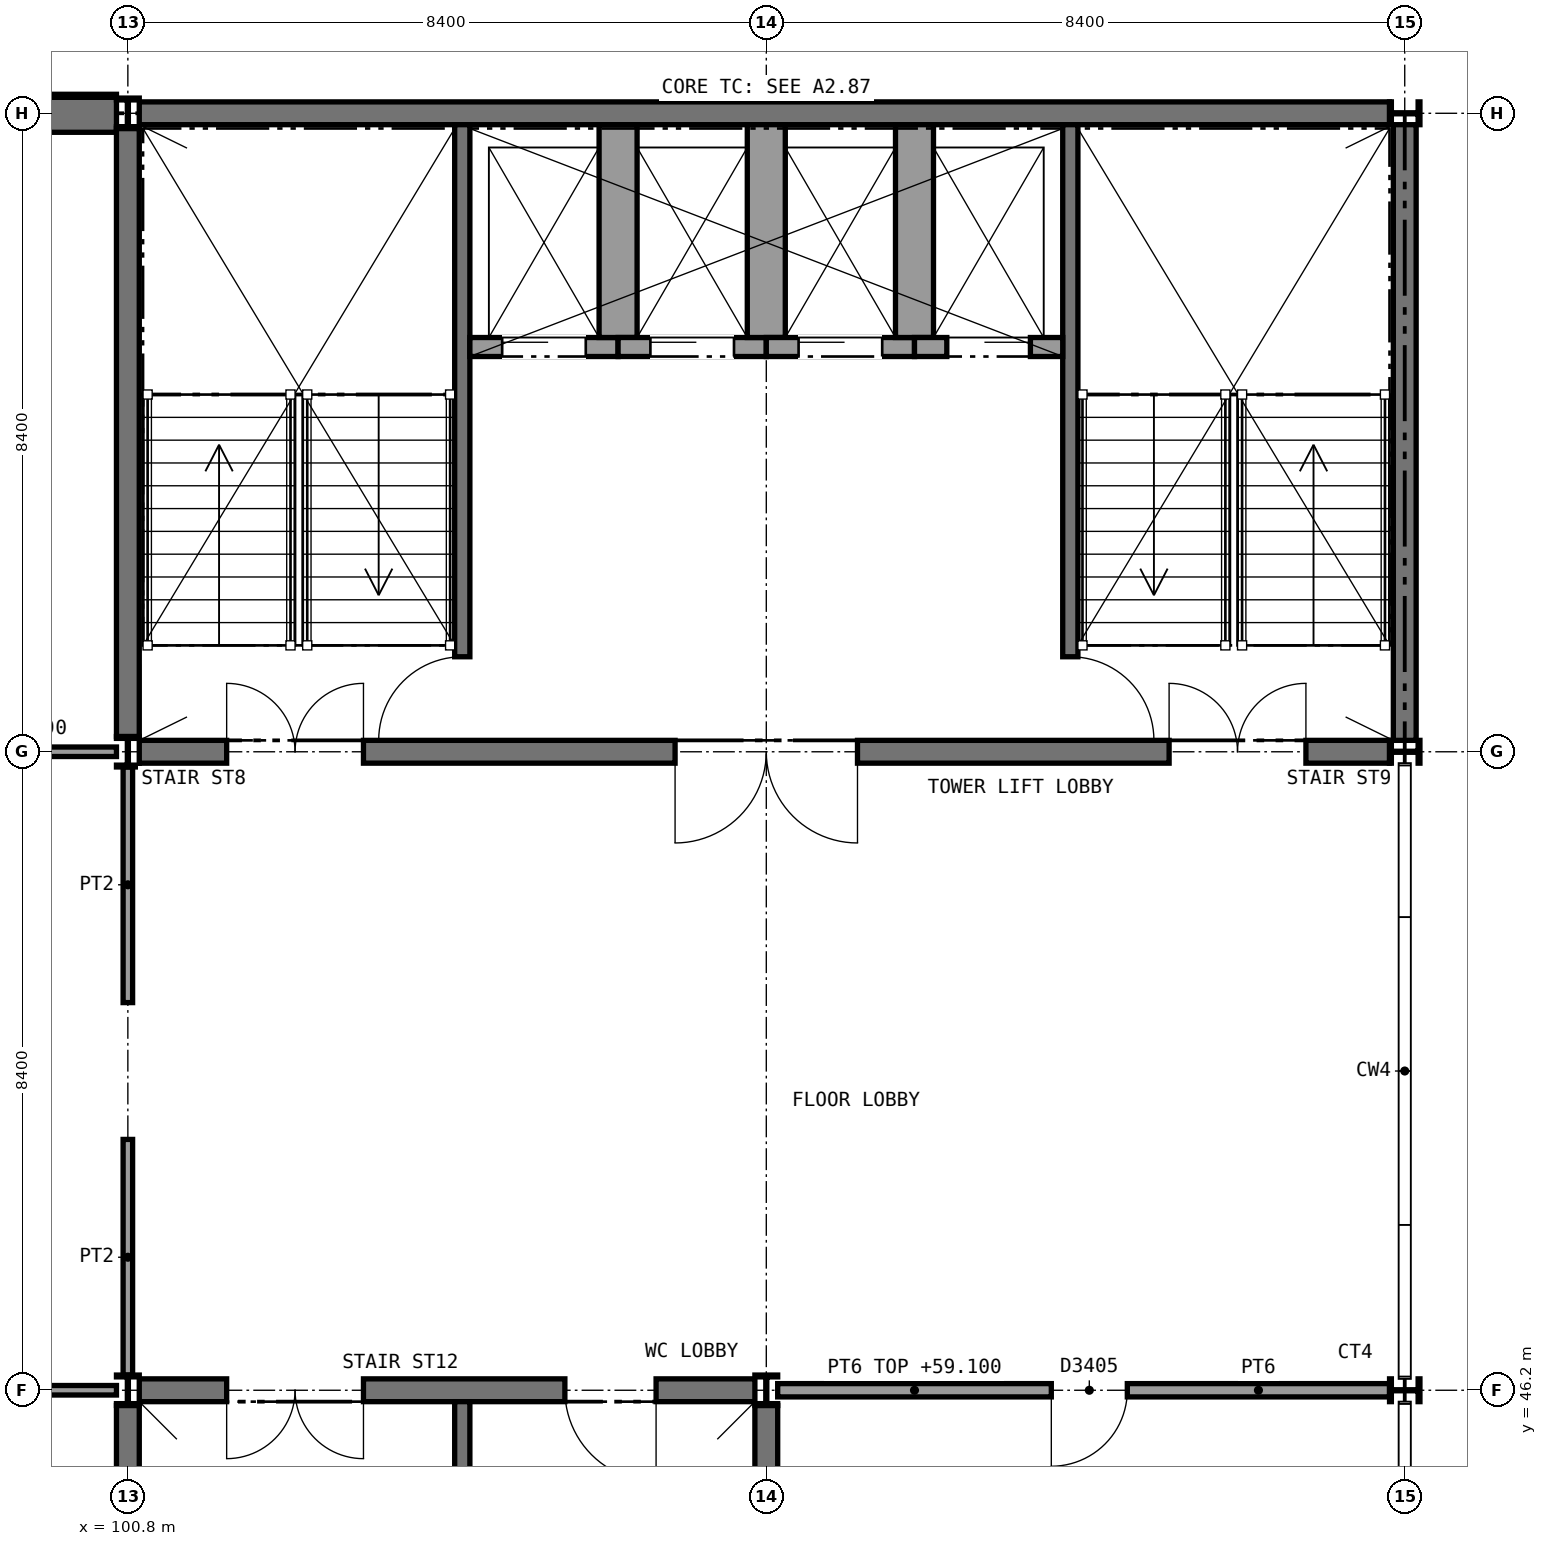
"""IFC4 building model, lengths in metres.
Left out: names, types, materials, properties, quantities, classifications, styles, units other than length and angle.
Written with IfcOpenShell. Run it as: python <this file> out.ifc"""

import sys

from ifc_helpers import new_model, si_unit, direction, frame, frame_2d, origin, origin_2d, place, context, subcontext, project, spatial, rectangle, i_section, extrude, element, fill, save


model = new_model("IFC4")
c1 = context("Model", 3, precision=1e-05, world=origin(), true_north=direction((0.0, 1.0)))
c2 = subcontext(c1, "Body", "Model", "MODEL_VIEW")
j1 = project(units=[si_unit("LENGTHUNIT", "METRE"), si_unit("PLANEANGLEUNIT", "RADIAN")], contexts=[c1])
p1 = place(None, origin())
s1 = spatial("IfcSite", under=j1, at=p1, CompositionType="ELEMENT")
p2 = place(p1, origin())
s2 = spatial("IfcBuilding", under=s1, at=p2, CompositionType="ELEMENT")
p3 = place(p2, frame((0.0, 0.0, 55.6)))
s3 = spatial("IfcBuildingStorey", under=s2, at=p3, CompositionType="ELEMENT", Elevation=55.6)
p4 = place(p3, frame((92.475, 63.0, 0.0), z_axis=(0.0, 0.0, 1.0), x_axis=(1.0, 0.0, 0.0)))
e1 = element("IfcWall", 1, at=p4, inside=s3, PredefinedType="SHEAR", context=c2, shape_type="SweptSolid", body=[
    extrude(rectangle(XDim=8.175, YDim=0.5, at=frame_2d((4.088, 0.0))), origin(), (0.0, 0.0, 1.0), 3.8),
])
p5 = place(p3, frame((100.95, 63.0, 0.0), z_axis=(0.0, 0.0, 1.0), x_axis=(1.0, 0.0, 0.0)))
e2 = element("IfcWall", 2, at=p5, inside=s3, PredefinedType="SHEAR", context=c2, shape_type="SweptSolid", body=[
    extrude(rectangle(XDim=16.45, YDim=0.3, at=frame_2d((8.225, 0.0))), origin(), (0.0, 0.0, 1.0), 3.85),
])
p6 = place(p3, frame((100.95, 54.6, 0.0), z_axis=(0.0, 0.0, 1.0), x_axis=(1.0, 0.0, 0.0)))
e3 = element("IfcWall", 3, at=p6, inside=s3, PredefinedType="SHEAR", context=c2, shape_type="SweptSolid", body=[
    extrude(rectangle(XDim=16.45, YDim=0.3, at=frame_2d((8.225, 0.0))), origin(), (0.0, 0.0, 1.0), 3.85),
])
p7 = place(p6, frame((1.15, 0.0, 0.0)))
e4 = element("IfcOpeningElement", 4, at=p7, cuts=e3, PredefinedType="OPENING", context=c2, shape_type="SweptSolid", body=[
    extrude(rectangle(XDim=1.8, YDim=2.1, at=frame_2d((0.9, 1.05))), frame((0.0, 0.16, 0.0), z_axis=(0.0, -1.0, 0.0), x_axis=(1.0, 0.0, 0.0)), (0.0, 0.0, 1.0), 0.32),
])
p8 = place(p6, frame((13.55, 0.0, 0.0)))
e5 = element("IfcOpeningElement", 5, at=p8, cuts=e3, PredefinedType="OPENING", context=c2, shape_type="SweptSolid", body=[
    extrude(rectangle(XDim=1.8, YDim=2.1, at=frame_2d((0.9, 1.05))), frame((0.0, 0.16, 0.0), z_axis=(0.0, -1.0, 0.0), x_axis=(1.0, 0.0, 0.0)), (0.0, 0.0, 1.0), 0.32),
])
p9 = place(p6, frame((7.05, 0.0, 0.0)))
e6 = element("IfcOpeningElement", 6, at=p9, cuts=e3, PredefinedType="OPENING", context=c2, shape_type="SweptSolid", body=[
    extrude(rectangle(XDim=2.4, YDim=2.4, at=frame_2d((1.2, 1.2))), frame((0.0, 0.16, 0.0), z_axis=(0.0, -1.0, 0.0), x_axis=(1.0, 0.0, 0.0)), (0.0, 0.0, 1.0), 0.32),
])
p10 = place(p3, frame((100.8, 54.8, 0.0), z_axis=(0.0, 0.0, 1.0), x_axis=(0.0, 1.0, 0.0)))
e7 = element("IfcWall", 7, at=p10, inside=s3, PredefinedType="SHEAR", context=c2, shape_type="SweptSolid", body=[
    extrude(rectangle(XDim=8.0, YDim=0.3, at=frame_2d((4.0, 0.0))), origin(), (0.0, 0.0, 1.0), 3.85),
])
p11 = place(p3, frame((117.6, 54.75, 0.0), z_axis=(0.0, 0.0, 1.0), x_axis=(0.0, 1.0, 0.0)))
e8 = element("IfcWall", 8, at=p11, inside=s3, PredefinedType="SHEAR", context=c2, shape_type="SweptSolid", body=[
    extrude(rectangle(XDim=8.1, YDim=0.3, at=frame_2d((4.05, 0.0))), origin(), (0.0, 0.0, 1.0), 3.85),
])
p12 = place(p3, frame((100.95, 46.2, 0.0), z_axis=(0.0, 0.0, 1.0), x_axis=(1.0, 0.0, 0.0)))
e9 = element("IfcWall", 9, at=p12, inside=s3, PredefinedType="SHEAR", context=c2, shape_type="SweptSolid", body=[
    extrude(rectangle(XDim=8.1, YDim=0.3, at=frame_2d((4.05, 0.0))), origin(), (0.0, 0.0, 1.0), 3.85),
])
p13 = place(p12, frame((1.15, 0.0, 0.0)))
e10 = element("IfcOpeningElement", 10, at=p13, cuts=e9, PredefinedType="OPENING", context=c2, shape_type="SweptSolid", body=[
    extrude(rectangle(XDim=1.8, YDim=2.1, at=frame_2d((0.9, 1.05))), frame((0.0, 0.16, 0.0), z_axis=(0.0, -1.0, 0.0), x_axis=(1.0, 0.0, 0.0)), (0.0, 0.0, 1.0), 0.32),
])
p14 = place(p12, frame((5.6, 0.0, 0.0)))
e11 = element("IfcOpeningElement", 11, at=p14, cuts=e9, PredefinedType="OPENING", context=c2, shape_type="SweptSolid", body=[
    extrude(rectangle(XDim=1.2, YDim=2.1, at=frame_2d((0.6, 1.05))), frame((0.0, 0.16, 0.0), z_axis=(0.0, -1.0, 0.0), x_axis=(1.0, 0.0, 0.0)), (0.0, 0.0, 1.0), 0.32),
])
for number, where, z_axis, x_axis in (
    (12, (100.8, 38.0, 0.0), (0.0, 0.0, 1.0), (0.0, 1.0, 0.0)),
    (13, (109.2, 38.0, 0.0), (0.0, 0.0, 1.0), (0.0, 1.0, 0.0)),
):
    element("IfcWall", number, at=place(p3, frame(where, z_axis=z_axis, x_axis=x_axis)), inside=s3, PredefinedType="SHEAR", context=c2, shape_type="SweptSolid", body=[
        extrude(rectangle(XDim=8.0, YDim=0.3, at=frame_2d((4.0, 0.0))), origin(), (0.0, 0.0, 1.0), 3.85),
    ])
for number, where, z_axis, x_axis in (
    (14, (100.8, 46.2, 0.0), (0.0, 0.0, 1.0), (1.0, 0.0, 0.0)),
    (15, (100.8, 54.6, 0.0), (0.0, 0.0, 1.0), (1.0, 0.0, 0.0)),
    (16, (100.8, 63.0, 0.0), (0.0, 0.0, 1.0), (1.0, 0.0, 0.0)),
    (17, (109.2, 46.2, 0.0), (0.0, 0.0, 1.0), (1.0, 0.0, 0.0)),
    (18, (117.6, 46.2, 0.0), (0.0, 0.0, 1.0), (0.0, 1.0, 0.0)),
    (19, (117.6, 54.6, 0.0), (0.0, 0.0, 1.0), (0.0, 1.0, 0.0)),
    (20, (117.6, 63.0, 0.0), (0.0, 0.0, 1.0), (0.0, 1.0, 0.0)),
):
    element("IfcColumn", number, at=place(p3, frame(where, z_axis=z_axis, x_axis=x_axis)), inside=s3, PredefinedType="COLUMN", context=c2, shape_type="SweptSolid", body=[
        extrude(i_section(OverallWidth=0.3, OverallDepth=0.4, WebThickness=0.013, FlangeThickness=0.024, FilletRadius=0.027, at=origin_2d()), origin(), (0.0, 0.0, 1.0), 4.0),
    ])
p15 = place(p3, frame((92.55, 46.2, 0.0), z_axis=(0.0, 0.0, 1.0), x_axis=(1.0, 0.0, 0.0)))
e21 = element("IfcWall", 21, at=p15, inside=s3, PredefinedType="PARTITIONING", context=c2, shape_type="SweptSolid", body=[
    extrude(rectangle(XDim=8.1, YDim=0.125, at=frame_2d((4.05, 0.0))), origin(), (0.0, 0.0, 1.0), 3.41),
])
p16 = place(p15, frame((3.1, 0.0, 0.0)))
e22 = element("IfcOpeningElement", 22, at=p16, cuts=e21, PredefinedType="OPENING", context=c2, shape_type="SweptSolid", body=[
    extrude(rectangle(XDim=1.8, YDim=2.1, at=frame_2d((0.9, 1.05))), frame((0.0, 0.073, 0.0), z_axis=(0.0, -1.0, 0.0), x_axis=(1.0, 0.0, 0.0)), (0.0, 0.0, 1.0), 0.145),
])
p17 = place(p3, frame((109.35, 46.2, 0.0), z_axis=(0.0, 0.0, 1.0), x_axis=(1.0, 0.0, 0.0)))
e23 = element("IfcWall", 23, at=p17, inside=s3, PredefinedType="PARTITIONING", context=c2, shape_type="SweptSolid", body=[
    extrude(rectangle(XDim=8.05, YDim=0.175, at=frame_2d((4.025, 0.0))), origin(), (0.0, 0.0, 1.0), 3.5),
])
p18 = place(p17, frame((3.6, 0.0, 0.0)))
e24 = element("IfcOpeningElement", 24, at=p18, cuts=e23, PredefinedType="OPENING", context=c2, shape_type="SweptSolid", body=[
    extrude(rectangle(XDim=1.0, YDim=2.1, at=frame_2d((0.5, 1.05))), frame((0.0, 0.098, 0.0), z_axis=(0.0, -1.0, 0.0), x_axis=(1.0, 0.0, 0.0)), (0.0, 0.0, 1.0), 0.195),
])
for number, where, z_axis, x_axis in (
    (25, (100.8, 46.4, 0.0), (0.0, 0.0, 1.0), (0.0, 1.0, 0.0)),
    (26, (100.8, 51.3, 0.0), (0.0, 0.0, 1.0), (0.0, 1.0, 0.0)),
):
    element("IfcWall", number, at=place(p3, frame(where, z_axis=z_axis, x_axis=x_axis)), inside=s3, PredefinedType="PARTITIONING", context=c2, shape_type="SweptSolid", body=[
        extrude(rectangle(XDim=3.1, YDim=0.125, at=frame_2d((1.55, 0.0))), origin(), (0.0, 0.0, 1.0), 3.41),
    ])
p19 = place(p3, frame((92.55, 54.6, 0.0), z_axis=(0.0, 0.0, 1.0), x_axis=(1.0, 0.0, 0.0)))
e27 = element("IfcWall", 27, at=p19, inside=s3, PredefinedType="PARTITIONING", context=c2, shape_type="SweptSolid", body=[
    extrude(rectangle(XDim=8.1, YDim=0.125, at=frame_2d((4.05, 0.0))), origin(), (0.0, 0.0, 1.0), 3.49),
])
p20 = place(p19, frame((3.6, 0.0, 0.0)))
e28 = element("IfcOpeningElement", 28, at=p20, cuts=e27, PredefinedType="OPENING", context=c2, shape_type="SweptSolid", body=[
    extrude(rectangle(XDim=0.9, YDim=2.1, at=frame_2d((0.45, 1.05))), frame((0.0, 0.073, 0.0), z_axis=(0.0, -1.0, 0.0), x_axis=(1.0, 0.0, 0.0)), (0.0, 0.0, 1.0), 0.145),
])
p21 = place(p3, frame((105.2, 62.85, 0.0), z_axis=(0.0, 0.0, 1.0), x_axis=(0.0, -1.0, 0.0)))
e29 = element("IfcWall", 29, at=p21, inside=s3, PredefinedType="SHEAR", context=c2, shape_type="SweptSolid", body=[
    extrude(rectangle(XDim=8.1, YDim=0.2, at=frame_2d((4.05, 0.0))), origin(), (0.0, 0.0, 1.0), 3.85),
])
p22 = place(p21, frame((7.0, 0.0, 0.0)))
e30 = element("IfcOpeningElement", 30, at=p22, cuts=e29, PredefinedType="OPENING", context=c2, shape_type="SweptSolid", body=[
    extrude(rectangle(XDim=1.11, YDim=2.1, at=frame_2d((0.555, 1.05))), frame((0.0, 0.11, 0.0), z_axis=(0.0, -1.0, 0.0), x_axis=(1.0, 0.0, 0.0)), (0.0, 0.0, 1.0), 0.22),
])
p23 = place(p3, frame((113.2, 62.85, 0.0), z_axis=(0.0, 0.0, 1.0), x_axis=(0.0, -1.0, 0.0)))
e31 = element("IfcWall", 31, at=p23, inside=s3, PredefinedType="SHEAR", context=c2, shape_type="SweptSolid", body=[
    extrude(rectangle(XDim=8.1, YDim=0.2, at=frame_2d((4.05, 0.0))), origin(), (0.0, 0.0, 1.0), 3.85),
])
p24 = place(p23, frame((7.0, 0.0, 0.0)))
e32 = element("IfcOpeningElement", 32, at=p24, cuts=e31, PredefinedType="OPENING", context=c2, shape_type="SweptSolid", body=[
    extrude(rectangle(XDim=1.11, YDim=2.1, at=frame_2d((0.555, 1.05))), frame((0.0, 0.11, 0.0), z_axis=(0.0, -1.0, 0.0), x_axis=(1.0, 0.0, 0.0)), (0.0, 0.0, 1.0), 0.22),
])
p25 = place(p3, frame((105.3, 59.925, 0.0), z_axis=(0.0, 0.0, 1.0), x_axis=(1.0, 0.0, 0.0)))
e33 = element("IfcWall", 33, at=p25, inside=s3, PredefinedType="SOLIDWALL", context=c2, shape_type="SweptSolid", body=[
    extrude(rectangle(XDim=1.95, YDim=0.25, at=frame_2d((0.975, 0.0))), origin(), (0.0, 0.0, 1.0), 4.0),
])
p26 = place(p25, frame((0.425, 0.0, 0.0)))
e34 = element("IfcOpeningElement", 34, at=p26, cuts=e33, PredefinedType="OPENING", context=c2, shape_type="SweptSolid", body=[
    extrude(rectangle(XDim=1.1, YDim=2.1, at=frame_2d((0.55, 1.05))), frame((0.0, 0.135, 0.0), z_axis=(0.0, -1.0, 0.0), x_axis=(1.0, 0.0, 0.0)), (0.0, 0.0, 1.0), 0.27),
])
p27 = place(p3, frame((107.25, 62.85, 0.0), z_axis=(0.0, 0.0, 1.0), x_axis=(0.0, -1.0, 0.0)))
e35 = element("IfcWall", 35, at=p27, inside=s3, PredefinedType="SOLIDWALL", context=c2, shape_type="SweptSolid", body=[
    extrude(rectangle(XDim=2.8, YDim=0.5, at=frame_2d((1.4, 0.0))), origin(), (0.0, 0.0, 1.0), 4.0),
])
p28 = place(p3, frame((107.25, 59.925, 0.0), z_axis=(0.0, 0.0, 1.0), x_axis=(1.0, 0.0, 0.0)))
e36 = element("IfcWall", 36, at=p28, inside=s3, PredefinedType="SOLIDWALL", context=c2, shape_type="SweptSolid", body=[
    extrude(rectangle(XDim=1.95, YDim=0.25, at=frame_2d((0.975, 0.0))), origin(), (0.0, 0.0, 1.0), 4.0),
])
p29 = place(p28, frame((0.425, 0.0, 0.0)))
e37 = element("IfcOpeningElement", 37, at=p29, cuts=e36, PredefinedType="OPENING", context=c2, shape_type="SweptSolid", body=[
    extrude(rectangle(XDim=1.1, YDim=2.1, at=frame_2d((0.55, 1.05))), frame((0.0, 0.135, 0.0), z_axis=(0.0, -1.0, 0.0), x_axis=(1.0, 0.0, 0.0)), (0.0, 0.0, 1.0), 0.27),
])
p30 = place(p3, frame((109.2, 62.85, 0.0), z_axis=(0.0, 0.0, 1.0), x_axis=(0.0, -1.0, 0.0)))
e38 = element("IfcWall", 38, at=p30, inside=s3, PredefinedType="SOLIDWALL", context=c2, shape_type="SweptSolid", body=[
    extrude(rectangle(XDim=2.8, YDim=0.5, at=frame_2d((1.4, 0.0))), origin(), (0.0, 0.0, 1.0), 4.0),
])
p31 = place(p3, frame((109.2, 59.925, 0.0), z_axis=(0.0, 0.0, 1.0), x_axis=(1.0, 0.0, 0.0)))
e39 = element("IfcWall", 39, at=p31, inside=s3, PredefinedType="SOLIDWALL", context=c2, shape_type="SweptSolid", body=[
    extrude(rectangle(XDim=1.95, YDim=0.25, at=frame_2d((0.975, 0.0))), origin(), (0.0, 0.0, 1.0), 4.0),
])
p32 = place(p31, frame((0.425, 0.0, 0.0)))
e40 = element("IfcOpeningElement", 40, at=p32, cuts=e39, PredefinedType="OPENING", context=c2, shape_type="SweptSolid", body=[
    extrude(rectangle(XDim=1.1, YDim=2.1, at=frame_2d((0.55, 1.05))), frame((0.0, 0.135, 0.0), z_axis=(0.0, -1.0, 0.0), x_axis=(1.0, 0.0, 0.0)), (0.0, 0.0, 1.0), 0.27),
])
p33 = place(p3, frame((111.15, 62.85, 0.0), z_axis=(0.0, 0.0, 1.0), x_axis=(0.0, -1.0, 0.0)))
e41 = element("IfcWall", 41, at=p33, inside=s3, PredefinedType="SOLIDWALL", context=c2, shape_type="SweptSolid", body=[
    extrude(rectangle(XDim=2.8, YDim=0.5, at=frame_2d((1.4, 0.0))), origin(), (0.0, 0.0, 1.0), 4.0),
])
p34 = place(p3, frame((111.15, 59.925, 0.0), z_axis=(0.0, 0.0, 1.0), x_axis=(1.0, 0.0, 0.0)))
e42 = element("IfcWall", 42, at=p34, inside=s3, PredefinedType="SOLIDWALL", context=c2, shape_type="SweptSolid", body=[
    extrude(rectangle(XDim=1.95, YDim=0.25, at=frame_2d((0.975, 0.0))), origin(), (0.0, 0.0, 1.0), 4.0),
])
p35 = place(p34, frame((0.425, 0.0, 0.0)))
e43 = element("IfcOpeningElement", 43, at=p35, cuts=e42, PredefinedType="OPENING", context=c2, shape_type="SweptSolid", body=[
    extrude(rectangle(XDim=1.1, YDim=2.1, at=frame_2d((0.55, 1.05))), frame((0.0, 0.135, 0.0), z_axis=(0.0, -1.0, 0.0), x_axis=(1.0, 0.0, 0.0)), (0.0, 0.0, 1.0), 0.27),
])
p36 = place(p3, frame((105.2, 37.95, 0.0), z_axis=(0.0, 0.0, 1.0), x_axis=(0.0, 1.0, 0.0)))
e44 = element("IfcWall", 44, at=p36, inside=s3, PredefinedType="SHEAR", context=c2, shape_type="SweptSolid", body=[
    extrude(rectangle(XDim=8.1, YDim=0.2, at=frame_2d((4.05, 0.0))), origin(), (0.0, 0.0, 1.0), 3.85),
])
p37 = place(p18, frame((1.0, 0.0, 0.0), z_axis=(0.0, 0.0, 1.0), x_axis=(-1.0, 0.0, 0.0)))
e45 = element("IfcDoor", 45, at=p37, inside=s3, OperationType="SINGLE_SWING_RIGHT", PredefinedType="DOOR", context=c2, shape_type="SweptSolid", body=[
    extrude(rectangle(XDim=1.0, YDim=2.1, at=frame_2d((0.5, 1.05))), frame((0.0, 0.025, 0.0), z_axis=(0.0, -1.0, 0.0), x_axis=(1.0, 0.0, 0.0)), (0.0, 0.0, 1.0), 0.05),
])
fill(e24, e45)
p38 = place(p22, frame((1.1, 0.0, 0.0), z_axis=(0.0, 0.0, 1.0), x_axis=(-1.0, 0.0, 0.0)))
e46 = element("IfcDoor", 46, at=p38, inside=s3, OperationType="SINGLE_SWING_LEFT", PredefinedType="DOOR", context=c2, shape_type="SweptSolid", body=[
    extrude(rectangle(XDim=1.1, YDim=2.1, at=frame_2d((0.55, 1.05))), frame((0.0, 0.025, 0.0), z_axis=(0.0, -1.0, 0.0), x_axis=(1.0, 0.0, 0.0)), (0.0, 0.0, 1.0), 0.05),
])
fill(e30, e46)
p39 = place(p24, origin())
e47 = element("IfcDoor", 47, at=p39, inside=s3, OperationType="SINGLE_SWING_RIGHT", PredefinedType="DOOR", context=c2, shape_type="SweptSolid", body=[
    extrude(rectangle(XDim=1.1, YDim=2.1, at=frame_2d((0.55, 1.05))), frame((0.0, 0.025, 0.0), z_axis=(0.0, -1.0, 0.0), x_axis=(1.0, 0.0, 0.0)), (0.0, 0.0, 1.0), 0.05),
])
fill(e32, e47)
p40 = place(p26, frame((1.1, 0.0, 0.0), z_axis=(0.0, 0.0, 1.0), x_axis=(-1.0, 0.0, 0.0)))
e48 = element("IfcDoor", 48, at=p40, inside=s3, OperationType="SLIDING_TO_RIGHT", PredefinedType="DOOR", context=c2, shape_type="SweptSolid", body=[
    extrude(rectangle(XDim=1.1, YDim=2.1, at=frame_2d((0.55, 1.05))), frame((0.0, 0.025, 0.0), z_axis=(0.0, -1.0, 0.0), x_axis=(1.0, 0.0, 0.0)), (0.0, 0.0, 1.0), 0.05),
])
fill(e34, e48)
p41 = place(p29, frame((1.1, 0.0, 0.0), z_axis=(0.0, 0.0, 1.0), x_axis=(-1.0, 0.0, 0.0)))
e49 = element("IfcDoor", 49, at=p41, inside=s3, OperationType="SLIDING_TO_RIGHT", PredefinedType="DOOR", context=c2, shape_type="SweptSolid", body=[
    extrude(rectangle(XDim=1.1, YDim=2.1, at=frame_2d((0.55, 1.05))), frame((0.0, 0.025, 0.0), z_axis=(0.0, -1.0, 0.0), x_axis=(1.0, 0.0, 0.0)), (0.0, 0.0, 1.0), 0.05),
])
fill(e37, e49)
p42 = place(p32, frame((1.1, 0.0, 0.0), z_axis=(0.0, 0.0, 1.0), x_axis=(-1.0, 0.0, 0.0)))
e50 = element("IfcDoor", 50, at=p42, inside=s3, OperationType="SLIDING_TO_RIGHT", PredefinedType="DOOR", context=c2, shape_type="SweptSolid", body=[
    extrude(rectangle(XDim=1.1, YDim=2.1, at=frame_2d((0.55, 1.05))), frame((0.0, 0.025, 0.0), z_axis=(0.0, -1.0, 0.0), x_axis=(1.0, 0.0, 0.0)), (0.0, 0.0, 1.0), 0.05),
])
fill(e40, e50)
p43 = place(p35, frame((1.1, 0.0, 0.0), z_axis=(0.0, 0.0, 1.0), x_axis=(-1.0, 0.0, 0.0)))
e51 = element("IfcDoor", 51, at=p43, inside=s3, OperationType="SLIDING_TO_LEFT", PredefinedType="DOOR", context=c2, shape_type="SweptSolid", body=[
    extrude(rectangle(XDim=1.1, YDim=2.1, at=frame_2d((0.55, 1.05))), frame((0.0, 0.025, 0.0), z_axis=(0.0, -1.0, 0.0), x_axis=(1.0, 0.0, 0.0)), (0.0, 0.0, 1.0), 0.05),
])
fill(e43, e51)
p44 = place(p7, origin())
e52 = element("IfcDoor", 52, at=p44, inside=s3, OperationType="DOUBLE_DOOR_SINGLE_SWING", PredefinedType="DOOR", context=c2, shape_type="SweptSolid", body=[
    extrude(rectangle(XDim=1.8, YDim=2.1, at=frame_2d((0.9, 1.05))), frame((0.0, 0.025, 0.0), z_axis=(0.0, -1.0, 0.0), x_axis=(1.0, 0.0, 0.0)), (0.0, 0.0, 1.0), 0.05),
])
fill(e4, e52)
p45 = place(p8, origin())
e53 = element("IfcDoor", 53, at=p45, inside=s3, OperationType="DOUBLE_DOOR_SINGLE_SWING", PredefinedType="DOOR", context=c2, shape_type="SweptSolid", body=[
    extrude(rectangle(XDim=1.8, YDim=2.1, at=frame_2d((0.9, 1.05))), frame((0.0, 0.025, 0.0), z_axis=(0.0, -1.0, 0.0), x_axis=(1.0, 0.0, 0.0)), (0.0, 0.0, 1.0), 0.05),
])
fill(e5, e53)
p46 = place(p9, frame((2.4, 0.0, 0.0), z_axis=(0.0, 0.0, 1.0), x_axis=(-1.0, 0.0, 0.0)))
e54 = element("IfcDoor", 54, at=p46, inside=s3, OperationType="DOUBLE_DOOR_SINGLE_SWING", PredefinedType="DOOR", context=c2, shape_type="SweptSolid", body=[
    extrude(rectangle(XDim=2.4, YDim=2.4, at=frame_2d((1.2, 1.2))), frame((0.0, 0.025, 0.0), z_axis=(0.0, -1.0, 0.0), x_axis=(1.0, 0.0, 0.0)), (0.0, 0.0, 1.0), 0.05),
])
fill(e6, e54)
p47 = place(p13, frame((1.8, 0.0, 0.0), z_axis=(0.0, 0.0, 1.0), x_axis=(-1.0, 0.0, 0.0)))
e55 = element("IfcDoor", 55, at=p47, inside=s3, OperationType="DOUBLE_DOOR_SINGLE_SWING", PredefinedType="DOOR", context=c2, shape_type="SweptSolid", body=[
    extrude(rectangle(XDim=1.8, YDim=2.1, at=frame_2d((0.9, 1.05))), frame((0.0, 0.025, 0.0), z_axis=(0.0, -1.0, 0.0), x_axis=(1.0, 0.0, 0.0)), (0.0, 0.0, 1.0), 0.05),
])
fill(e10, e55)
p48 = place(p14, frame((1.2, 0.0, 0.0), z_axis=(0.0, 0.0, 1.0), x_axis=(-1.0, 0.0, 0.0)))
e56 = element("IfcDoor", 56, at=p48, inside=s3, OperationType="SINGLE_SWING_LEFT", PredefinedType="DOOR", context=c2, shape_type="SweptSolid", body=[
    extrude(rectangle(XDim=1.2, YDim=2.1, at=frame_2d((0.6, 1.05))), frame((0.0, 0.025, 0.0), z_axis=(0.0, -1.0, 0.0), x_axis=(1.0, 0.0, 0.0)), (0.0, 0.0, 1.0), 0.05),
])
fill(e11, e56)
save(model, sys.argv[1])
